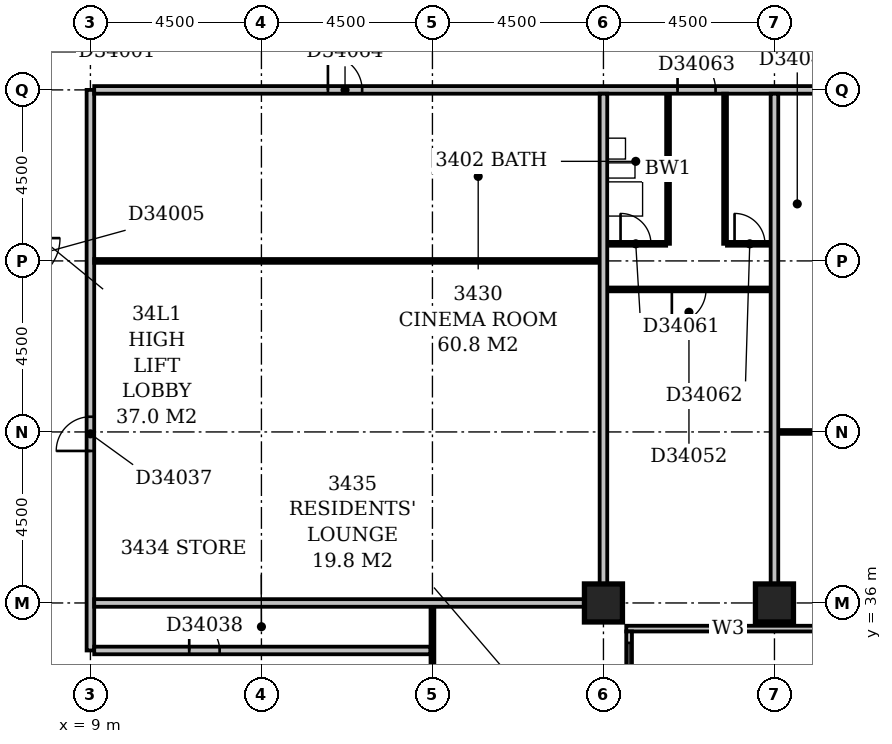
"""IFC4 building model, lengths in metres.
Left out: names, types, materials, properties, quantities, classifications, styles, units other than length and angle.
Written with IfcOpenShell. Run it as: python <this file> out.ifc"""

import sys

from ifc_helpers import new_model, si_unit, direction, frame, frame_2d, origin, origin_2d, place, context, subcontext, project, spatial, rectangle, extrude, element, fill, save


model = new_model("IFC4")
c1 = context("Model", 3, precision=1e-05, world=origin(), true_north=direction((0.0, 1.0)))
c2 = subcontext(c1, "Body", "Model", "MODEL_VIEW")
j1 = project(units=[si_unit("LENGTHUNIT", "METRE"), si_unit("PLANEANGLEUNIT", "RADIAN")], contexts=[c1])
p1 = place(None, origin())
s1 = spatial("IfcSite", under=j1, at=p1, CompositionType="ELEMENT")
p2 = place(p1, origin())
s2 = spatial("IfcBuilding", under=s1, at=p2, CompositionType="ELEMENT")
p3 = place(p2, frame((0.0, 0.0, 137.6)))
s3 = spatial("IfcBuildingStorey", under=s2, at=p3, CompositionType="ELEMENT", Elevation=137.6)
for number, where, z_axis, x_axis in (
    (1, (22.5, 36.0, -0.3), (0.0, 0.0, 1.0), (1.0, 0.0, 0.0)),
    (2, (27.0, 36.0, -0.3), (0.0, 0.0, 1.0), (1.0, 0.0, 0.0)),
):
    element("IfcColumn", number, at=place(p3, frame(where, z_axis=z_axis, x_axis=x_axis)), inside=s3, PredefinedType="COLUMN", context=c2, shape_type="SweptSolid", body=[
        extrude(rectangle(XDim=1.0, YDim=1.0, at=origin_2d()), origin(), (0.0, 0.0, 1.0), 3.6),
    ])
p4 = place(p3, frame((23.175, 17.4, 0.0), z_axis=(0.0, 0.0, 1.0), x_axis=(0.0, 1.0, 0.0)))
e3 = element("IfcWall", 3, at=p4, inside=s3, PredefinedType="STANDARD", context=c2, shape_type="SweptSolid", body=[
    extrude(rectangle(XDim=17.85, YDim=0.15, at=frame_2d((8.925, 0.0))), origin(), (0.0, 0.0, 1.0), 2.7),
])
p5 = place(p4, frame((3.05, 0.0, 0.6)))
e4 = element("IfcOpeningElement", 4, at=p5, cuts=e3, PredefinedType="OPENING", context=c2, shape_type="SweptSolid", body=[
    extrude(rectangle(XDim=1.2, YDim=1.8, at=frame_2d((0.6, 0.9))), frame((0.0, 0.087, 0.0), z_axis=(0.0, -1.0, 0.0), x_axis=(1.0, 0.0, 0.0)), (0.0, 0.0, 1.0), 0.174),
])
p6 = place(p4, frame((6.15, 0.0, 0.6)))
e5 = element("IfcOpeningElement", 5, at=p6, cuts=e3, PredefinedType="OPENING", context=c2, shape_type="SweptSolid", body=[
    extrude(rectangle(XDim=2.4, YDim=1.8, at=frame_2d((1.2, 0.9))), frame((0.0, 0.087, 0.0), z_axis=(0.0, -1.0, 0.0), x_axis=(1.0, 0.0, 0.0)), (0.0, 0.0, 1.0), 0.174),
])
p7 = place(p4, frame((10.65, 0.0, 0.6)))
e6 = element("IfcOpeningElement", 6, at=p7, cuts=e3, PredefinedType="OPENING", context=c2, shape_type="SweptSolid", body=[
    extrude(rectangle(XDim=2.4, YDim=1.8, at=frame_2d((1.2, 0.9))), frame((0.0, 0.087, 0.0), z_axis=(0.0, -1.0, 0.0), x_axis=(1.0, 0.0, 0.0)), (0.0, 0.0, 1.0), 0.174),
])
p8 = place(p4, frame((15.15, 0.0, 0.6)))
e7 = element("IfcOpeningElement", 7, at=p8, cuts=e3, PredefinedType="OPENING", context=c2, shape_type="SweptSolid", body=[
    extrude(rectangle(XDim=2.4, YDim=1.8, at=frame_2d((1.2, 0.9))), frame((0.0, 0.087, 0.0), z_axis=(0.0, -1.0, 0.0), x_axis=(1.0, 0.0, 0.0)), (0.0, 0.0, 1.0), 0.174),
])
p9 = place(p3, frame((23.1, 35.325, 0.0), z_axis=(0.0, 0.0, 1.0), x_axis=(1.0, 0.0, 0.0)))
e8 = element("IfcWall", 8, at=p9, inside=s3, PredefinedType="STANDARD", context=c2, shape_type="SweptSolid", body=[
    extrude(rectangle(XDim=45.15, YDim=0.15, at=frame_2d((22.575, 0.0))), origin(), (0.0, 0.0, 1.0), 2.7),
])
p10 = place(p9, frame((2.235, 0.0, 0.6)))
e9 = element("IfcOpeningElement", 9, at=p10, cuts=e8, PredefinedType="OPENING", context=c2, shape_type="SweptSolid", body=[
    extrude(rectangle(XDim=0.9, YDim=1.8, at=frame_2d((0.45, 0.9))), frame((0.0, 0.087, 0.0), z_axis=(0.0, -1.0, 0.0), x_axis=(1.0, 0.0, 0.0)), (0.0, 0.0, 1.0), 0.174),
])
p11 = place(p9, frame((4.95, 0.0, 0.6)))
e10 = element("IfcOpeningElement", 10, at=p11, cuts=e8, PredefinedType="OPENING", context=c2, shape_type="SweptSolid", body=[
    extrude(rectangle(XDim=2.4, YDim=1.8, at=frame_2d((1.2, 0.9))), frame((0.0, 0.087, 0.0), z_axis=(0.0, -1.0, 0.0), x_axis=(1.0, 0.0, 0.0)), (0.0, 0.0, 1.0), 0.174),
])
p12 = place(p9, frame((9.45, 0.0, 0.6)))
e11 = element("IfcOpeningElement", 11, at=p12, cuts=e8, PredefinedType="OPENING", context=c2, shape_type="SweptSolid", body=[
    extrude(rectangle(XDim=2.4, YDim=1.8, at=frame_2d((1.2, 0.9))), frame((0.0, 0.087, 0.0), z_axis=(0.0, -1.0, 0.0), x_axis=(1.0, 0.0, 0.0)), (0.0, 0.0, 1.0), 0.174),
])
p13 = place(p9, frame((13.95, 0.0, 0.6)))
e12 = element("IfcOpeningElement", 12, at=p13, cuts=e8, PredefinedType="OPENING", context=c2, shape_type="SweptSolid", body=[
    extrude(rectangle(XDim=2.4, YDim=1.8, at=frame_2d((1.2, 0.9))), frame((0.0, 0.087, 0.0), z_axis=(0.0, -1.0, 0.0), x_axis=(1.0, 0.0, 0.0)), (0.0, 0.0, 1.0), 0.174),
])
p14 = place(p9, frame((18.45, 0.0, 0.6)))
e13 = element("IfcOpeningElement", 13, at=p14, cuts=e8, PredefinedType="OPENING", context=c2, shape_type="SweptSolid", body=[
    extrude(rectangle(XDim=2.4, YDim=1.8, at=frame_2d((1.2, 0.9))), frame((0.0, 0.087, 0.0), z_axis=(0.0, -1.0, 0.0), x_axis=(1.0, 0.0, 0.0)), (0.0, 0.0, 1.0), 0.174),
])
p15 = place(p9, frame((22.66, 0.0, 0.6)))
e14 = element("IfcOpeningElement", 14, at=p15, cuts=e8, PredefinedType="OPENING", context=c2, shape_type="SweptSolid", body=[
    extrude(rectangle(XDim=1.8, YDim=1.8, at=frame_2d((0.9, 0.9))), frame((0.0, 0.087, 0.0), z_axis=(0.0, -1.0, 0.0), x_axis=(1.0, 0.0, 0.0)), (0.0, 0.0, 1.0), 0.174),
])
p16 = place(p9, frame((28.911, 0.0, 0.6)))
e15 = element("IfcOpeningElement", 15, at=p16, cuts=e8, PredefinedType="OPENING", context=c2, shape_type="SweptSolid", body=[
    extrude(rectangle(XDim=1.2, YDim=1.8, at=frame_2d((0.6, 0.9))), frame((0.0, 0.087, 0.0), z_axis=(0.0, -1.0, 0.0), x_axis=(1.0, 0.0, 0.0)), (0.0, 0.0, 1.0), 0.174),
])
p17 = place(p9, frame((31.95, 0.0, 0.6)))
e16 = element("IfcOpeningElement", 16, at=p17, cuts=e8, PredefinedType="OPENING", context=c2, shape_type="SweptSolid", body=[
    extrude(rectangle(XDim=2.4, YDim=1.8, at=frame_2d((1.2, 0.9))), frame((0.0, 0.087, 0.0), z_axis=(0.0, -1.0, 0.0), x_axis=(1.0, 0.0, 0.0)), (0.0, 0.0, 1.0), 0.174),
])
p18 = place(p9, frame((36.45, 0.0, 0.6)))
e17 = element("IfcOpeningElement", 17, at=p18, cuts=e8, PredefinedType="OPENING", context=c2, shape_type="SweptSolid", body=[
    extrude(rectangle(XDim=2.4, YDim=1.8, at=frame_2d((1.2, 0.9))), frame((0.0, 0.087, 0.0), z_axis=(0.0, -1.0, 0.0), x_axis=(1.0, 0.0, 0.0)), (0.0, 0.0, 1.0), 0.174),
])
p19 = place(p9, frame((40.95, 0.0, 0.6)))
e18 = element("IfcOpeningElement", 18, at=p19, cuts=e8, PredefinedType="OPENING", context=c2, shape_type="SweptSolid", body=[
    extrude(rectangle(XDim=2.4, YDim=1.8, at=frame_2d((1.2, 0.9))), frame((0.0, 0.087, 0.0), z_axis=(0.0, -1.0, 0.0), x_axis=(1.0, 0.0, 0.0)), (0.0, 0.0, 1.0), 0.174),
])
p20 = place(p3, frame((18.0, 31.6, 0.0), z_axis=(0.0, 0.0, 1.0), x_axis=(0.0, 1.0, 0.0)))
e19 = element("IfcWall", 19, at=p20, inside=s3, PredefinedType="PARTITIONING", context=c2, shape_type="SweptSolid", body=[
    extrude(rectangle(XDim=4.3, YDim=0.1, at=frame_2d((2.15, 0.0))), origin(), (0.0, 0.0, 1.0), 3.3),
])
p21 = place(p20, frame((1.7, 0.0, 0.0)))
e20 = element("IfcOpeningElement", 20, at=p21, cuts=e19, PredefinedType="OPENING", context=c2, shape_type="SweptSolid", body=[
    extrude(rectangle(XDim=0.9, YDim=2.1, at=frame_2d((0.45, 1.05))), frame((0.0, 0.062, 0.0), z_axis=(0.0, -1.0, 0.0), x_axis=(1.0, 0.0, 0.0)), (0.0, 0.0, 1.0), 0.124),
])
p22 = place(p3, frame((9.0, 34.75, 0.0), z_axis=(0.0, 0.0, 1.0), x_axis=(0.0, 1.0, 0.0)))
e21 = element("IfcWall", 21, at=p22, inside=s3, PredefinedType="PARTITIONING", context=c2, shape_type="SweptSolid", body=[
    extrude(rectangle(XDim=14.75, YDim=0.2, at=frame_2d((7.375, 0.0))), origin(), (0.0, 0.0, 1.0), 3.3),
])
p23 = place(p22, frame((5.25, 0.0, 0.0)))
e22 = element("IfcOpeningElement", 22, at=p23, cuts=e21, PredefinedType="OPENING", context=c2, shape_type="SweptSolid", body=[
    extrude(rectangle(XDim=0.9, YDim=2.1, at=frame_2d((0.45, 1.05))), frame((0.0, 0.112, 0.0), z_axis=(0.0, -1.0, 0.0), x_axis=(1.0, 0.0, 0.0)), (0.0, 0.0, 1.0), 0.224),
])
p24 = place(p3, frame((9.1, 34.75, 0.0), z_axis=(0.0, 0.0, 1.0), x_axis=(1.0, 0.0, 0.0)))
e23 = element("IfcWall", 23, at=p24, inside=s3, PredefinedType="PARTITIONING", context=c2, shape_type="SweptSolid", body=[
    extrude(rectangle(XDim=8.85, YDim=0.2, at=frame_2d((4.425, 0.0))), origin(), (0.0, 0.0, 1.0), 3.3),
])
p25 = place(p24, frame((2.5, 0.0, 0.0)))
e24 = element("IfcOpeningElement", 24, at=p25, cuts=e23, PredefinedType="OPENING", context=c2, shape_type="SweptSolid", body=[
    extrude(rectangle(XDim=0.8, YDim=2.1, at=frame_2d((0.4, 1.05))), frame((0.0, 0.112, 0.0), z_axis=(0.0, -1.0, 0.0), x_axis=(1.0, 0.0, 0.0)), (0.0, 0.0, 1.0), 0.224),
])
for number, where, z_axis, x_axis in (
    (25, (9.1, 36.0, 0.0), (0.0, 0.0, 1.0), (1.0, 0.0, 0.0)),
    (26, (22.5, 36.5, 0.0), (0.0, 0.0, 1.0), (0.0, 1.0, 0.0)),
):
    element("IfcWall", number, at=place(p3, frame(where, z_axis=z_axis, x_axis=x_axis)), inside=s3, PredefinedType="PARTITIONING", context=c2, shape_type="SweptSolid", body=[
        extrude(rectangle(XDim=12.9, YDim=0.2, at=frame_2d((6.45, 0.0))), origin(), (0.0, 0.0, 1.0), 3.3),
    ])
p26 = place(p3, frame((27.0, 36.5, 0.0), z_axis=(0.0, 0.0, 1.0), x_axis=(0.0, 1.0, 0.0)))
e27 = element("IfcWall", 27, at=p26, inside=s3, PredefinedType="PARTITIONING", context=c2, shape_type="SweptSolid", body=[
    extrude(rectangle(XDim=12.9, YDim=0.2, at=frame_2d((6.45, 0.0))), origin(), (0.0, 0.0, 1.0), 2.6),
])
p27 = place(p3, frame((27.1, 40.5, 0.0), z_axis=(0.0, 0.0, 1.0), x_axis=(1.0, 0.0, 0.0)))
e28 = element("IfcWall", 28, at=p27, inside=s3, PredefinedType="PARTITIONING", context=c2, shape_type="SweptSolid", body=[
    extrude(rectangle(XDim=4.3, YDim=0.1, at=frame_2d((2.15, 0.0))), origin(), (0.0, 0.0, 1.0), 3.3),
])
p28 = place(p27, frame((1.7, 0.0, 0.0)))
e29 = element("IfcOpeningElement", 29, at=p28, cuts=e28, PredefinedType="OPENING", context=c2, shape_type="SweptSolid", body=[
    extrude(rectangle(XDim=0.9, YDim=2.1, at=frame_2d((0.45, 1.05))), frame((0.0, 0.062, 0.0), z_axis=(0.0, -1.0, 0.0), x_axis=(1.0, 0.0, 0.0)), (0.0, 0.0, 1.0), 0.124),
])
p29 = place(p3, frame((22.6, 44.25, 0.0), z_axis=(0.0, 0.0, 1.0), x_axis=(1.0, 0.0, 0.0)))
e30 = element("IfcWall", 30, at=p29, inside=s3, PredefinedType="PARTITIONING", context=c2, shape_type="SweptSolid", body=[
    extrude(rectangle(XDim=4.3, YDim=0.1, at=frame_2d((2.15, 0.0))), origin(), (0.0, 0.0, 1.0), 3.3),
])
p30 = place(p29, frame((1.7, 0.0, 0.0)))
e31 = element("IfcOpeningElement", 31, at=p30, cuts=e30, PredefinedType="OPENING", context=c2, shape_type="SweptSolid", body=[
    extrude(rectangle(XDim=0.9, YDim=2.1, at=frame_2d((0.45, 1.05))), frame((0.0, 0.062, 0.0), z_axis=(0.0, -1.0, 0.0), x_axis=(1.0, 0.0, 0.0)), (0.0, 0.0, 1.0), 0.124),
])
p31 = place(p3, frame((9.1, 45.0, 0.0), z_axis=(0.0, 0.0, 1.0), x_axis=(1.0, 0.0, 0.0)))
e32 = element("IfcWall", 32, at=p31, inside=s3, PredefinedType="PARTITIONING", context=c2, shape_type="SweptSolid", body=[
    extrude(rectangle(XDim=13.3, YDim=0.1, at=frame_2d((6.65, 0.0))), origin(), (0.0, 0.0, 1.0), 3.3),
])
p32 = place(p3, frame((22.6, 45.45, 0.0), z_axis=(0.0, 0.0, 1.0), x_axis=(1.0, 0.0, 0.0)))
e33 = element("IfcWall", 33, at=p32, inside=s3, PredefinedType="PARTITIONING", context=c2, shape_type="SweptSolid", body=[
    extrude(rectangle(XDim=1.55, YDim=0.1, at=frame_2d((0.775, 0.0))), origin(), (0.0, 0.0, 1.0), 3.3),
])
p33 = place(p32, frame((0.35, 0.0, 0.0)))
e34 = element("IfcOpeningElement", 34, at=p33, cuts=e33, PredefinedType="OPENING", context=c2, shape_type="SweptSolid", body=[
    extrude(rectangle(XDim=0.8, YDim=2.1, at=frame_2d((0.4, 1.05))), frame((0.0, 0.062, 0.0), z_axis=(0.0, -1.0, 0.0), x_axis=(1.0, 0.0, 0.0)), (0.0, 0.0, 1.0), 0.124),
])
p34 = place(p3, frame((24.2, 45.45, 0.0), z_axis=(0.0, 0.0, 1.0), x_axis=(0.0, 1.0, 0.0)))
e35 = element("IfcWall", 35, at=p34, inside=s3, PredefinedType="PLUMBINGWALL", context=c2, shape_type="SweptSolid", body=[
    extrude(rectangle(XDim=3.95, YDim=0.1, at=frame_2d((1.975, 0.0))), origin(), (0.0, 0.0, 1.0), 3.3),
])
p35 = place(p3, frame((25.7, 45.45, 0.0), z_axis=(0.0, 0.0, 1.0), x_axis=(0.0, 1.0, 0.0)))
e36 = element("IfcWall", 36, at=p35, inside=s3, PredefinedType="PARTITIONING", context=c2, shape_type="SweptSolid", body=[
    extrude(rectangle(XDim=3.95, YDim=0.1, at=frame_2d((1.975, 0.0))), origin(), (0.0, 0.0, 1.0), 3.3),
])
p36 = place(p3, frame((25.75, 45.45, 0.0), z_axis=(0.0, 0.0, 1.0), x_axis=(1.0, 0.0, 0.0)))
e37 = element("IfcWall", 37, at=p36, inside=s3, PredefinedType="PARTITIONING", context=c2, shape_type="SweptSolid", body=[
    extrude(rectangle(XDim=1.15, YDim=0.1, at=frame_2d((0.575, 0.0))), origin(), (0.0, 0.0, 1.0), 3.3),
])
p37 = place(p36, frame((0.2, 0.0, 0.0)))
e38 = element("IfcOpeningElement", 38, at=p37, cuts=e37, PredefinedType="OPENING", context=c2, shape_type="SweptSolid", body=[
    extrude(rectangle(XDim=0.8, YDim=2.1, at=frame_2d((0.4, 1.05))), frame((0.0, 0.062, 0.0), z_axis=(0.0, -1.0, 0.0), x_axis=(1.0, 0.0, 0.0)), (0.0, 0.0, 1.0), 0.124),
])
p38 = place(p3, frame((9.1, 49.5, 0.0), z_axis=(0.0, 0.0, 1.0), x_axis=(1.0, 0.0, 0.0)))
e39 = element("IfcWall", 39, at=p38, inside=s3, PredefinedType="PARTITIONING", context=c2, shape_type="SweptSolid", body=[
    extrude(rectangle(XDim=19.05, YDim=0.2, at=frame_2d((9.525, 0.0))), origin(), (0.0, 0.0, 1.0), 3.3),
])
p39 = place(p38, frame((15.35, 0.0, 0.0)))
e40 = element("IfcOpeningElement", 40, at=p39, cuts=e39, PredefinedType="OPENING", context=c2, shape_type="SweptSolid", body=[
    extrude(rectangle(XDim=1.0, YDim=2.1, at=frame_2d((0.5, 1.05))), frame((0.0, 0.112, 0.0), z_axis=(0.0, -1.0, 0.0), x_axis=(1.0, 0.0, 0.0)), (0.0, 0.0, 1.0), 0.224),
])
p40 = place(p38, frame((6.15, 0.0, 0.0)))
e41 = element("IfcOpeningElement", 41, at=p40, cuts=e39, PredefinedType="OPENING", context=c2, shape_type="SweptSolid", body=[
    extrude(rectangle(XDim=0.9, YDim=2.1, at=frame_2d((0.45, 1.05))), frame((0.0, 0.112, 0.0), z_axis=(0.0, -1.0, 0.0), x_axis=(1.0, 0.0, 0.0)), (0.0, 0.0, 1.0), 0.224),
])
p41 = place(p8, origin())
e42 = element("IfcWindow", 42, at=p41, inside=s3, PartitioningType="SINGLE_PANEL", PredefinedType="WINDOW", context=c2, shape_type="SweptSolid", body=[
    extrude(rectangle(XDim=2.4, YDim=1.8, at=frame_2d((1.2, 0.9))), frame((0.0, 0.03, 0.0), z_axis=(0.0, -1.0, 0.0), x_axis=(1.0, 0.0, 0.0)), (0.0, 0.0, 1.0), 0.06),
])
fill(e7, e42)
p42 = place(p10, origin())
e43 = element("IfcWindow", 43, at=p42, inside=s3, PartitioningType="SINGLE_PANEL", PredefinedType="WINDOW", context=c2, shape_type="SweptSolid", body=[
    extrude(rectangle(XDim=0.9, YDim=1.8, at=frame_2d((0.45, 0.9))), frame((0.0, 0.03, 0.0), z_axis=(0.0, -1.0, 0.0), x_axis=(1.0, 0.0, 0.0)), (0.0, 0.0, 1.0), 0.06),
])
fill(e9, e43)
p43 = place(p23, origin())
e44 = element("IfcDoor", 44, at=p43, inside=s3, OperationType="SINGLE_SWING_LEFT", PredefinedType="DOOR", context=c2, shape_type="SweptSolid", body=[
    extrude(rectangle(XDim=0.9, YDim=2.1, at=frame_2d((0.45, 1.05))), frame((0.0, 0.025, 0.0), z_axis=(0.0, -1.0, 0.0), x_axis=(1.0, 0.0, 0.0)), (0.0, 0.0, 1.0), 0.05),
])
fill(e22, e44)
p44 = place(p25, origin())
e45 = element("IfcDoor", 45, at=p44, inside=s3, OperationType="SINGLE_SWING_LEFT", PredefinedType="DOOR", context=c2, shape_type="SweptSolid", body=[
    extrude(rectangle(XDim=0.8, YDim=2.1, at=frame_2d((0.4, 1.05))), frame((0.0, 0.025, 0.0), z_axis=(0.0, -1.0, 0.0), x_axis=(1.0, 0.0, 0.0)), (0.0, 0.0, 1.0), 0.05),
])
fill(e24, e45)
p45 = place(p30, frame((0.9, 0.0, 0.0), z_axis=(0.0, 0.0, 1.0), x_axis=(-1.0, 0.0, 0.0)))
e46 = element("IfcDoor", 46, at=p45, inside=s3, OperationType="SINGLE_SWING_RIGHT", PredefinedType="DOOR", context=c2, shape_type="SweptSolid", body=[
    extrude(rectangle(XDim=0.9, YDim=2.1, at=frame_2d((0.45, 1.05))), frame((0.0, 0.025, 0.0), z_axis=(0.0, -1.0, 0.0), x_axis=(1.0, 0.0, 0.0)), (0.0, 0.0, 1.0), 0.05),
])
fill(e31, e46)
p46 = place(p33, origin())
e47 = element("IfcDoor", 47, at=p46, inside=s3, OperationType="SINGLE_SWING_LEFT", PredefinedType="DOOR", context=c2, shape_type="SweptSolid", body=[
    extrude(rectangle(XDim=0.8, YDim=2.1, at=frame_2d((0.4, 1.05))), frame((0.0, 0.025, 0.0), z_axis=(0.0, -1.0, 0.0), x_axis=(1.0, 0.0, 0.0)), (0.0, 0.0, 1.0), 0.05),
])
fill(e34, e47)
p47 = place(p37, origin())
e48 = element("IfcDoor", 48, at=p47, inside=s3, OperationType="SINGLE_SWING_LEFT", PredefinedType="DOOR", context=c2, shape_type="SweptSolid", body=[
    extrude(rectangle(XDim=0.8, YDim=2.1, at=frame_2d((0.4, 1.05))), frame((0.0, 0.025, 0.0), z_axis=(0.0, -1.0, 0.0), x_axis=(1.0, 0.0, 0.0)), (0.0, 0.0, 1.0), 0.05),
])
fill(e38, e48)
p48 = place(p39, origin())
e49 = element("IfcDoor", 49, at=p48, inside=s3, OperationType="SINGLE_SWING_LEFT", PredefinedType="DOOR", context=c2, shape_type="SweptSolid", body=[
    extrude(rectangle(XDim=1.0, YDim=2.1, at=frame_2d((0.5, 1.05))), frame((0.0, 0.025, 0.0), z_axis=(0.0, -1.0, 0.0), x_axis=(1.0, 0.0, 0.0)), (0.0, 0.0, 1.0), 0.05),
])
fill(e40, e49)
p49 = place(p40, origin())
e50 = element("IfcDoor", 50, at=p49, inside=s3, OperationType="SINGLE_SWING_LEFT", PredefinedType="DOOR", context=c2, shape_type="SweptSolid", body=[
    extrude(rectangle(XDim=0.9, YDim=2.1, at=frame_2d((0.45, 1.05))), frame((0.0, 0.025, 0.0), z_axis=(0.0, -1.0, 0.0), x_axis=(1.0, 0.0, 0.0)), (0.0, 0.0, 1.0), 0.05),
])
fill(e41, e50)
save(model, sys.argv[1])
